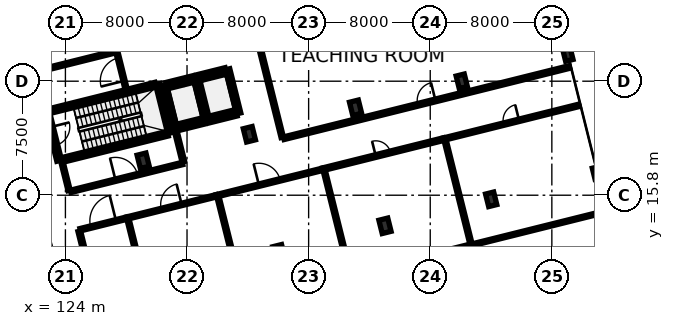
"""IFC4 building model, lengths in metres.
Left out: names, types, materials, properties, quantities, classifications, styles, units other than length and angle.
Written with IfcOpenShell. Run it as: python <this file> out.ifc"""

import sys

from ifc_helpers import new_model, si_unit, direction, frame, frame_2d, origin, origin_2d, place, context, subcontext, project, spatial, rectangle, extrude, element, fill, save


model = new_model("IFC4")
c1 = context("Model", 3, precision=1e-05, world=origin(), true_north=direction((0.0, 1.0)))
c2 = subcontext(c1, "Body", "Model", "MODEL_VIEW")
j1 = project(units=[si_unit("LENGTHUNIT", "METRE"), si_unit("PLANEANGLEUNIT", "RADIAN")], contexts=[c1])
p1 = place(None, origin())
s1 = spatial("IfcSite", under=j1, at=p1, CompositionType="ELEMENT")
p2 = place(p1, origin())
s2 = spatial("IfcBuilding", under=s1, at=p2, CompositionType="ELEMENT")
p3 = place(p2, origin())
s3 = spatial("IfcBuildingStorey", under=s2, at=p3, CompositionType="ELEMENT", Elevation=0.0)
for number, where, z_axis, x_axis in (
    (1, (129.115, 18.067, 0.0), (0.0, 0.0, 1.0), (0.97, 0.242, 0.0)),
    (2, (138.037, 12.046, 0.0), (0.0, 0.0, 1.0), (0.97, 0.242, 0.0)),
    (3, (136.102, 19.808, 0.0), (0.0, 0.0, 1.0), (0.97, 0.242, 0.0)),
    (4, (145.023, 13.788, 0.0), (0.0, 0.0, 1.0), (0.97, 0.242, 0.0)),
    (5, (143.088, 21.55, 0.0), (0.0, 0.0, 1.0), (0.97, 0.242, 0.0)),
):
    element("IfcColumn", number, at=place(p3, frame(where, z_axis=z_axis, x_axis=x_axis)), inside=s3, PredefinedType="COLUMN", context=c2, shape_type="SweptSolid", body=[
        extrude(rectangle(XDim=0.6, YDim=0.9, at=origin_2d()), origin(), (0.0, 0.0, 1.0), 4.7),
    ])
for number, where, z_axis, x_axis in (
    (6, (152.009, 15.53, 0.0), (0.0, 0.0, 1.0), (0.97, 0.242, 0.0)),
    (7, (150.074, 23.292, 0.0), (0.0, 0.0, 1.0), (0.97, 0.242, 0.0)),
):
    element("IfcColumn", number, at=place(p3, frame(where, z_axis=z_axis, x_axis=x_axis)), inside=s3, PredefinedType="COLUMN", context=c2, shape_type="SweptSolid", body=[
        extrude(rectangle(XDim=0.55, YDim=0.85, at=origin_2d()), origin(), (0.0, 0.0, 1.0), 4.7),
    ])
for number, where, z_axis, x_axis in (
    (8, (158.995, 17.271, 0.0), (0.0, 0.0, 1.0), (0.97, 0.242, 0.0)),
    (9, (157.06, 25.034, 0.0), (0.0, 0.0, 1.0), (0.97, 0.242, 0.0)),
):
    element("IfcColumn", number, at=place(p3, frame(where, z_axis=z_axis, x_axis=x_axis)), inside=s3, PredefinedType="COLUMN", context=c2, shape_type="SweptSolid", body=[
        extrude(rectangle(XDim=0.5, YDim=0.75, at=origin_2d()), origin(), (0.0, 0.0, 1.0), 4.7),
    ])
p4 = place(p3, frame((123.75, 18.11, 0.0), z_axis=(0.0, 0.0, 1.0), x_axis=(0.970294108333, 0.241928384724, 0.0)))
e10 = element("IfcWall", 10, at=p4, inside=s3, PredefinedType="SHEAR", context=c2, shape_type="SweptSolid", body=[
    extrude(rectangle(XDim=7.19, YDim=0.32, at=frame_2d((3.595, 0.0))), origin(), (0.0, 0.0, 1.0), 4.7),
])
p5 = place(p3, frame((130.887, 19.889, 0.0), z_axis=(0.0, 0.0, 1.0), x_axis=(-0.241947258837, 0.970289402158, 0.0)))
e11 = element("IfcWall", 11, at=p5, inside=s3, PredefinedType="SHEAR", context=c2, shape_type="SweptSolid", body=[
    extrude(rectangle(XDim=3.32, YDim=0.32, at=frame_2d((1.66, 0.0))), origin(), (0.0, 0.0, 1.0), 4.7),
])
p6 = place(p3, frame((129.924, 23.071, 0.0), z_axis=(0.0, 0.0, 1.0), x_axis=(-0.970294108333, -0.241928384724, 0.0)))
e12 = element("IfcWall", 12, at=p6, inside=s3, PredefinedType="SHEAR", context=c2, shape_type="SweptSolid", body=[
    extrude(rectangle(XDim=7.19, YDim=0.32, at=frame_2d((3.595, 0.0))), origin(), (0.0, 0.0, 1.0), 4.7),
])
p7 = place(p3, frame((122.787, 21.292, 0.0), z_axis=(0.0, 0.0, 1.0), x_axis=(0.241860763027, -0.970310966293, 0.0)))
e13 = element("IfcWall", 13, at=p7, inside=s3, PredefinedType="SHEAR", context=c2, shape_type="SweptSolid", body=[
    extrude(rectangle(XDim=3.32, YDim=0.32, at=frame_2d((1.66, 0.0))), origin(), (0.0, 0.0, 1.0), 4.7),
])
p8 = place(p7, frame((1.035, 0.0, 0.0)))
e14 = element("IfcOpeningElement", 14, at=p8, cuts=e13, PredefinedType="OPENING", context=c2, shape_type="SweptSolid", body=[
    extrude(rectangle(XDim=1.25, YDim=2.2, at=frame_2d((0.625, 1.1))), frame((0.0, 0.172, 0.0), z_axis=(0.0, -1.0, 0.0), x_axis=(1.0, 0.0, 0.0)), (0.0, 0.0, 1.0), 0.344),
])
p9 = place(p3, frame((131.363, 20.176, 0.0), z_axis=(0.0, 0.0, 1.0), x_axis=(0.970284587517, 0.241966566341, 0.0)))
e15 = element("IfcWall", 15, at=p9, inside=s3, PredefinedType="SHEAR", context=c2, shape_type="SweptSolid", body=[
    extrude(rectangle(XDim=1.817, YDim=0.28, at=frame_2d((0.909, 0.0))), origin(), (0.0, 0.0, 1.0), 4.7),
])
p10 = place(p3, frame((133.267, 20.651, 0.0), z_axis=(0.0, 0.0, 1.0), x_axis=(-0.241921647353, 0.970295788171, 0.0)))
e16 = element("IfcWall", 16, at=p10, inside=s3, PredefinedType="SHEAR", context=c2, shape_type="SweptSolid", body=[
    extrude(rectangle(XDim=2.994, YDim=0.28, at=frame_2d((1.497, 0.0))), origin(), (0.0, 0.0, 1.0), 4.7),
])
p11 = place(p3, frame((132.402, 23.521, 0.0), z_axis=(0.0, 0.0, 1.0), x_axis=(-0.970284587517, -0.241966566341, 0.0)))
e17 = element("IfcWall", 17, at=p11, inside=s3, PredefinedType="SHEAR", context=c2, shape_type="SweptSolid", body=[
    extrude(rectangle(XDim=1.817, YDim=0.28, at=frame_2d((0.909, 0.0))), origin(), (0.0, 0.0, 1.0), 4.7),
])
p12 = place(p11, frame((0.259, 0.0, 0.0)))
e18 = element("IfcOpeningElement", 18, at=p12, cuts=e17, PredefinedType="OPENING", context=c2, shape_type="SweptSolid", body=[
    extrude(rectangle(XDim=1.3, YDim=2.2, at=frame_2d((0.65, 1.1))), frame((0.0, 0.152, 0.0), z_axis=(0.0, -1.0, 0.0), x_axis=(1.0, 0.0, 0.0)), (0.0, 0.0, 1.0), 0.304),
])
p13 = place(p3, frame((130.498, 23.046, 0.0), z_axis=(0.0, 0.0, 1.0), x_axis=(0.241921647353, -0.970295788171, 0.0)))
e19 = element("IfcWall", 19, at=p13, inside=s3, PredefinedType="SHEAR", context=c2, shape_type="SweptSolid", body=[
    extrude(rectangle(XDim=2.994, YDim=0.28, at=frame_2d((1.497, 0.0))), origin(), (0.0, 0.0, 1.0), 4.7),
])
p14 = place(p3, frame((133.408, 20.686, 0.0), z_axis=(0.0, 0.0, 1.0), x_axis=(0.970285190026, 0.241964150272, 0.0)))
e20 = element("IfcWall", 20, at=p14, inside=s3, PredefinedType="SHEAR", context=c2, shape_type="SweptSolid", body=[
    extrude(rectangle(XDim=1.91, YDim=0.28, at=frame_2d((0.955, 0.0))), origin(), (0.0, 0.0, 1.0), 4.7),
])
p15 = place(p3, frame((135.402, 21.183, 0.0), z_axis=(0.0, 0.0, 1.0), x_axis=(-0.241921647353, 0.970295788171, 0.0)))
e21 = element("IfcWall", 21, at=p15, inside=s3, PredefinedType="SHEAR", context=c2, shape_type="SweptSolid", body=[
    extrude(rectangle(XDim=2.994, YDim=0.28, at=frame_2d((1.497, 0.0))), origin(), (0.0, 0.0, 1.0), 4.7),
])
p16 = place(p3, frame((134.537, 24.053, 0.0), z_axis=(0.0, 0.0, 1.0), x_axis=(-0.970285190026, -0.241964150272, 0.0)))
e22 = element("IfcWall", 22, at=p16, inside=s3, PredefinedType="SHEAR", context=c2, shape_type="SweptSolid", body=[
    extrude(rectangle(XDim=1.91, YDim=0.28, at=frame_2d((0.955, 0.0))), origin(), (0.0, 0.0, 1.0), 4.7),
])
p17 = place(p16, frame((0.305, 0.0, 0.0)))
e23 = element("IfcOpeningElement", 23, at=p17, cuts=e22, PredefinedType="OPENING", context=c2, shape_type="SweptSolid", body=[
    extrude(rectangle(XDim=1.3, YDim=2.2, at=frame_2d((0.65, 1.1))), frame((0.0, 0.152, 0.0), z_axis=(0.0, -1.0, 0.0), x_axis=(1.0, 0.0, 0.0)), (0.0, 0.0, 1.0), 0.304),
])
p18 = place(p3, frame((124.346, 16.053, 0.0), z_axis=(0.0, 0.0, 1.0), x_axis=(0.970295772287, 0.241921711059, 0.0)))
e24 = element("IfcWall", 24, at=p18, inside=s3, PredefinedType="PARTITIONING", context=c2, shape_type="SweptSolid", body=[
    extrude(rectangle(XDim=7.58, YDim=0.16, at=frame_2d((3.79, 0.0))), origin(), (0.0, 0.0, 1.0), 3.885),
])
p19 = place(p18, frame((3.04, 0.0, 0.0)))
e25 = element("IfcOpeningElement", 25, at=p19, cuts=e24, PredefinedType="OPENING", context=c2, shape_type="SweptSolid", body=[
    extrude(rectangle(XDim=1.5, YDim=2.28, at=frame_2d((0.75, 1.14))), frame((0.0, 0.092, 0.0), z_axis=(0.0, -1.0, 0.0), x_axis=(1.0, 0.0, 0.0)), (0.0, 0.0, 1.0), 0.184),
])
p20 = place(p3, frame((127.995, 22.767, 0.0), z_axis=(0.0, 0.0, 1.0), x_axis=(-0.241877500256, 0.9703067942, 0.0)))
e26 = element("IfcWall", 26, at=p20, inside=s3, PredefinedType="PARTITIONING", context=c2, shape_type="SweptSolid", body=[
    extrude(rectangle(XDim=2.706, YDim=0.15, at=frame_2d((1.353, 0.0))), origin(), (0.0, 0.0, 1.0), 4.7),
])
p21 = place(p20, frame((0.573, 0.0, 0.0)))
e27 = element("IfcOpeningElement", 27, at=p21, cuts=e26, PredefinedType="OPENING", context=c2, shape_type="SweptSolid", body=[
    extrude(rectangle(XDim=1.56, YDim=2.3, at=frame_2d((0.78, 1.15))), frame((0.0, 0.087, 0.0), z_axis=(0.0, -1.0, 0.0), x_axis=(1.0, 0.0, 0.0)), (0.0, 0.0, 1.0), 0.174),
])
p22 = place(p3, frame((124.975, 13.53, 0.0), z_axis=(0.0, 0.0, 1.0), x_axis=(0.970289141252, 0.241948305158, 0.0)))
e28 = element("IfcWall", 28, at=p22, inside=s3, PredefinedType="PARTITIONING", context=c2, shape_type="SweptSolid", body=[
    extrude(rectangle(XDim=3.13, YDim=0.16, at=frame_2d((1.565, 0.0))), origin(), (0.0, 0.0, 1.0), 4.7),
])
p23 = place(p22, frame((0.705, 0.0, 0.0)))
e29 = element("IfcOpeningElement", 29, at=p23, cuts=e28, PredefinedType="OPENING", context=c2, shape_type="SweptSolid", body=[
    extrude(rectangle(XDim=1.72, YDim=2.34, at=frame_2d((0.86, 1.17))), frame((0.0, 0.092, 0.0), z_axis=(0.0, -1.0, 0.0), x_axis=(1.0, 0.0, 0.0)), (0.0, 0.0, 1.0), 0.184),
])
p24 = place(p3, frame((128.023, 14.29, 0.0), z_axis=(0.0, 0.0, 1.0), x_axis=(0.970293282145, 0.241931698263, 0.0)))
e30 = element("IfcWall", 30, at=p24, inside=s3, PredefinedType="PARTITIONING", context=c2, shape_type="SweptSolid", body=[
    extrude(rectangle(XDim=6.088, YDim=0.16, at=frame_2d((3.044, 0.0))), origin(), (0.0, 0.0, 1.0), 3.885),
])
p25 = place(p24, frame((2.354, 0.0, 0.0)))
e31 = element("IfcOpeningElement", 31, at=p25, cuts=e30, PredefinedType="OPENING", context=c2, shape_type="SweptSolid", body=[
    extrude(rectangle(XDim=1.38, YDim=2.3, at=frame_2d((0.69, 1.15))), frame((0.0, 0.092, 0.0), z_axis=(0.0, -1.0, 0.0), x_axis=(1.0, 0.0, 0.0)), (0.0, 0.0, 1.0), 0.184),
])
p26 = place(p3, frame((133.942, 15.766, 0.0), z_axis=(0.0, 0.0, 1.0), x_axis=(0.970292162734, 0.241936187739, 0.0)))
e32 = element("IfcWall", 32, at=p26, inside=s3, PredefinedType="PARTITIONING", context=c2, shape_type="SweptSolid", body=[
    extrude(rectangle(XDim=7.188, YDim=0.16, at=frame_2d((3.594, 0.0))), origin(), (0.0, 0.0, 1.0), 3.885),
])
p27 = place(p26, frame((2.874, 0.0, 0.0)))
e33 = element("IfcOpeningElement", 33, at=p27, cuts=e32, PredefinedType="OPENING", context=c2, shape_type="SweptSolid", body=[
    extrude(rectangle(XDim=1.44, YDim=2.32, at=frame_2d((0.72, 1.16))), frame((0.0, 0.092, 0.0), z_axis=(0.0, -1.0, 0.0), x_axis=(1.0, 0.0, 0.0)), (0.0, 0.0, 1.0), 0.184),
])
p28 = place(p3, frame((140.928, 17.508, 0.0), z_axis=(0.0, 0.0, 1.0), x_axis=(0.970293149657, 0.241932229621, 0.0)))
e34 = element("IfcWall", 34, at=p28, inside=s3, PredefinedType="PARTITIONING", context=c2, shape_type="SweptSolid", body=[
    extrude(rectangle(XDim=8.188, YDim=0.18, at=frame_2d((4.094, 0.0))), origin(), (0.0, 0.0, 1.0), 3.885),
])
p29 = place(p28, frame((3.594, 0.0, 0.0)))
e35 = element("IfcOpeningElement", 35, at=p29, cuts=e34, PredefinedType="OPENING", context=c2, shape_type="SweptSolid", body=[
    extrude(rectangle(XDim=1.0, YDim=2.15, at=frame_2d((0.5, 1.075))), frame((0.0, 0.102, 0.0), z_axis=(0.0, -1.0, 0.0), x_axis=(1.0, 0.0, 0.0)), (0.0, 0.0, 1.0), 0.204),
])
p30 = place(p3, frame((148.885, 19.491, 0.0), z_axis=(0.0, 0.0, 1.0), x_axis=(0.970294203895, 0.241928001454, 0.0)))
e36 = element("IfcWall", 36, at=p30, inside=s3, PredefinedType="PARTITIONING", context=c2, shape_type="SweptSolid", body=[
    extrude(rectangle(XDim=9.171, YDim=0.16, at=frame_2d((4.585, 0.0))), origin(), (0.0, 0.0, 1.0), 3.885),
])
p31 = place(p30, frame((4.061, 0.0, 0.0)))
e37 = element("IfcOpeningElement", 37, at=p31, cuts=e36, PredefinedType="OPENING", context=c2, shape_type="SweptSolid", body=[
    extrude(rectangle(XDim=1.05, YDim=2.15, at=frame_2d((0.525, 1.075))), frame((0.0, 0.092, 0.0), z_axis=(0.0, -1.0, 0.0), x_axis=(1.0, 0.0, 0.0)), (0.0, 0.0, 1.0), 0.184),
])
p32 = place(p3, frame((138.367, 19.549, 0.0), z_axis=(0.0, 0.0, 1.0), x_axis=(0.970295834183, 0.241921462809, 0.0)))
e38 = element("IfcWall", 38, at=p32, inside=s3, PredefinedType="PARTITIONING", context=c2, shape_type="SweptSolid", body=[
    extrude(rectangle(XDim=19.363, YDim=0.18, at=frame_2d((9.682, 0.0))), origin(), (0.0, 0.0, 1.0), 3.885),
])
p33 = place(p32, frame((9.082, 0.0, 0.0)))
e39 = element("IfcOpeningElement", 39, at=p33, cuts=e38, PredefinedType="OPENING", context=c2, shape_type="SweptSolid", body=[
    extrude(rectangle(XDim=1.2, YDim=2.15, at=frame_2d((0.6, 1.075))), frame((0.0, 0.102, 0.0), z_axis=(0.0, -1.0, 0.0), x_axis=(1.0, 0.0, 0.0)), (0.0, 0.0, 1.0), 0.204),
])
p34 = place(p3, frame((124.243, 16.115, 0.0), z_axis=(0.0, 0.0, 1.0), x_axis=(-0.24202255973, 0.970270622343, 0.0)))
e40 = element("IfcWall", 40, at=p34, inside=s3, PredefinedType="PARTITIONING", context=c2, shape_type="SweptSolid", body=[
    extrude(rectangle(XDim=1.792, YDim=0.15, at=frame_2d((0.896, 0.0))), origin(), (0.0, 0.0, 1.0), 3.985),
])
p35 = place(p3, frame((131.763, 17.99, 0.0), z_axis=(0.0, 0.0, 1.0), x_axis=(-0.241962612769, 0.970285573438, 0.0)))
e41 = element("IfcWall", 41, at=p35, inside=s3, PredefinedType="PARTITIONING", context=c2, shape_type="SweptSolid", body=[
    extrude(rectangle(XDim=2.206, YDim=0.18, at=frame_2d((1.103, 0.0))), origin(), (0.0, 0.0, 1.0), 3.985),
])
p36 = place(p3, frame((120.535, 23.554, 0.0), z_axis=(0.0, 0.0, 1.0), x_axis=(0.970294973208, 0.241924915969, 0.0)))
e42 = element("IfcWall", 42, at=p36, inside=s3, PredefinedType="PARTITIONING", context=c2, shape_type="SweptSolid", body=[
    extrude(rectangle(XDim=6.961, YDim=0.16, at=frame_2d((3.48, 0.0))), origin(), (0.0, 0.0, 1.0), 3.985),
])
p37 = place(p3, frame((126.58, 6.74, 0.0), z_axis=(0.0, 0.0, 1.0), x_axis=(-0.24192707633, 0.97029443456, 0.0)))
e43 = element("IfcWall", 43, at=p37, inside=s3, PredefinedType="PARTITIONING", context=c2, shape_type="SweptSolid", body=[
    extrude(rectangle(XDim=6.892, YDim=0.18, at=frame_2d((3.446, 0.0))), origin(), (0.0, 0.0, 1.0), 3.985),
])
p38 = place(p3, frame((129.804, 7.45, 0.0), z_axis=(0.0, 0.0, 1.0), x_axis=(-0.241901504068, 0.970300810228, 0.0)))
e44 = element("IfcWall", 44, at=p38, inside=s3, PredefinedType="PARTITIONING", context=c2, shape_type="SweptSolid", body=[
    extrude(rectangle(XDim=6.976, YDim=0.15, at=frame_2d((3.488, 0.0))), origin(), (0.0, 0.0, 1.0), 3.985),
])
p39 = place(p3, frame((135.737, 8.87, 0.0), z_axis=(0.0, 0.0, 1.0), x_axis=(-0.241939357675, 0.970291372325, 0.0)))
e45 = element("IfcWall", 45, at=p39, inside=s3, PredefinedType="PARTITIONING", context=c2, shape_type="SweptSolid", body=[
    extrude(rectangle(XDim=7.033, YDim=0.15, at=frame_2d((3.517, 0.0))), origin(), (0.0, 0.0, 1.0), 3.985),
])
p40 = place(p3, frame((142.72, 10.622, 0.0), z_axis=(0.0, 0.0, 1.0), x_axis=(-0.241913043167, 0.970297933393, 0.0)))
e46 = element("IfcWall", 46, at=p40, inside=s3, PredefinedType="PARTITIONING", context=c2, shape_type="SweptSolid", body=[
    extrude(rectangle(XDim=7.013, YDim=0.15, at=frame_2d((3.506, 0.0))), origin(), (0.0, 0.0, 1.0), 3.985),
])
p41 = place(p3, frame((142.67, 10.522, 0.0), z_axis=(0.0, 0.0, 1.0), x_axis=(0.970298403727, 0.241911156677, 0.0)))
e47 = element("IfcWall", 47, at=p41, inside=s3, PredefinedType="PARTITIONING", context=c2, shape_type="SweptSolid", body=[
    extrude(rectangle(XDim=8.188, YDim=0.15, at=frame_2d((4.094, 0.0))), origin(), (0.0, 0.0, 1.0), 3.885),
])
p42 = place(p3, frame((150.677, 12.605, 0.0), z_axis=(0.0, 0.0, 1.0), x_axis=(-0.241913935588, 0.970297710895, 0.0)))
e48 = element("IfcWall", 48, at=p42, inside=s3, PredefinedType="PARTITIONING", context=c2, shape_type="SweptSolid", body=[
    extrude(rectangle(XDim=7.023, YDim=0.15, at=frame_2d((3.511, 0.0))), origin(), (0.0, 0.0, 1.0), 3.985),
])
p43 = place(p3, frame((150.627, 12.505, 0.0), z_axis=(0.0, 0.0, 1.0), x_axis=(0.970292717865, 0.241933961357, 0.0)))
e49 = element("IfcWall", 49, at=p43, inside=s3, PredefinedType="PARTITIONING", context=c2, shape_type="SweptSolid", body=[
    extrude(rectangle(XDim=9.071, YDim=0.125, at=frame_2d((4.536, 0.0))), origin(), (0.0, 0.0, 1.0), 3.885),
])
p44 = place(p3, frame((138.264, 19.611, 0.0), z_axis=(0.0, 0.0, 1.0), x_axis=(-0.241920353256, 0.970296110824, 0.0)))
e50 = element("IfcWall", 50, at=p44, inside=s3, PredefinedType="PARTITIONING", context=c2, shape_type="SweptSolid", body=[
    extrude(rectangle(XDim=8.03, YDim=0.16, at=frame_2d((4.015, 0.0))), origin(), (0.0, 0.0, 1.0), 3.985),
])
p45 = place(p8, origin())
e51 = element("IfcDoor", 51, at=p45, inside=s3, OperationType="SINGLE_SWING_LEFT", PredefinedType="DOOR", context=c2, shape_type="SweptSolid", body=[
    extrude(rectangle(XDim=1.25, YDim=2.2, at=frame_2d((0.625, 1.1))), frame((0.0, 0.025, 0.0), z_axis=(0.0, -1.0, 0.0), x_axis=(1.0, 0.0, 0.0)), (0.0, 0.0, 1.0), 0.05),
])
fill(e14, e51)
p46 = place(p12, origin())
e52 = element("IfcDoor", 52, at=p46, inside=s3, OperationType="SLIDING_TO_LEFT", PredefinedType="DOOR", context=c2, shape_type="SweptSolid", body=[
    extrude(rectangle(XDim=1.3, YDim=2.2, at=frame_2d((0.65, 1.1))), frame((0.0, 0.025, 0.0), z_axis=(0.0, -1.0, 0.0), x_axis=(1.0, 0.0, 0.0)), (0.0, 0.0, 1.0), 0.05),
])
fill(e18, e52)
p47 = place(p17, origin())
e53 = element("IfcDoor", 53, at=p47, inside=s3, OperationType="SLIDING_TO_RIGHT", PredefinedType="DOOR", context=c2, shape_type="SweptSolid", body=[
    extrude(rectangle(XDim=1.3, YDim=2.2, at=frame_2d((0.65, 1.1))), frame((0.0, 0.025, 0.0), z_axis=(0.0, -1.0, 0.0), x_axis=(1.0, 0.0, 0.0)), (0.0, 0.0, 1.0), 0.05),
])
fill(e23, e53)
p48 = place(p19, origin())
e54 = element("IfcDoor", 54, at=p48, inside=s3, OperationType="SINGLE_SWING_LEFT", PredefinedType="DOOR", context=c2, shape_type="SweptSolid", body=[
    extrude(rectangle(XDim=1.5, YDim=2.28, at=frame_2d((0.75, 1.14))), frame((0.0, 0.025, 0.0), z_axis=(0.0, -1.0, 0.0), x_axis=(1.0, 0.0, 0.0)), (0.0, 0.0, 1.0), 0.05),
])
fill(e25, e54)
p49 = place(p21, origin())
e55 = element("IfcDoor", 55, at=p49, inside=s3, OperationType="SINGLE_SWING_LEFT", PredefinedType="DOOR", context=c2, shape_type="SweptSolid", body=[
    extrude(rectangle(XDim=1.56, YDim=2.3, at=frame_2d((0.78, 1.15))), frame((0.0, 0.025, 0.0), z_axis=(0.0, -1.0, 0.0), x_axis=(1.0, 0.0, 0.0)), (0.0, 0.0, 1.0), 0.05),
])
fill(e27, e55)
p50 = place(p23, origin())
e56 = element("IfcDoor", 56, at=p50, inside=s3, OperationType="SINGLE_SWING_RIGHT", PredefinedType="DOOR", context=c2, shape_type="SweptSolid", body=[
    extrude(rectangle(XDim=1.72, YDim=2.34, at=frame_2d((0.86, 1.17))), frame((0.0, 0.025, 0.0), z_axis=(0.0, -1.0, 0.0), x_axis=(1.0, 0.0, 0.0)), (0.0, 0.0, 1.0), 0.05),
])
fill(e29, e56)
p51 = place(p25, origin())
e57 = element("IfcDoor", 57, at=p51, inside=s3, OperationType="SINGLE_SWING_RIGHT", PredefinedType="DOOR", context=c2, shape_type="SweptSolid", body=[
    extrude(rectangle(XDim=1.38, YDim=2.3, at=frame_2d((0.69, 1.15))), frame((0.0, 0.025, 0.0), z_axis=(0.0, -1.0, 0.0), x_axis=(1.0, 0.0, 0.0)), (0.0, 0.0, 1.0), 0.05),
])
fill(e31, e57)
p52 = place(p27, origin())
e58 = element("IfcDoor", 58, at=p52, inside=s3, OperationType="SINGLE_SWING_LEFT", PredefinedType="DOOR", context=c2, shape_type="SweptSolid", body=[
    extrude(rectangle(XDim=1.44, YDim=2.32, at=frame_2d((0.72, 1.16))), frame((0.0, 0.025, 0.0), z_axis=(0.0, -1.0, 0.0), x_axis=(1.0, 0.0, 0.0)), (0.0, 0.0, 1.0), 0.05),
])
fill(e33, e58)
p53 = place(p29, origin())
e59 = element("IfcDoor", 59, at=p53, inside=s3, OperationType="SINGLE_SWING_LEFT", PredefinedType="DOOR", context=c2, shape_type="SweptSolid", body=[
    extrude(rectangle(XDim=1.0, YDim=2.15, at=frame_2d((0.5, 1.075))), frame((0.0, 0.025, 0.0), z_axis=(0.0, -1.0, 0.0), x_axis=(1.0, 0.0, 0.0)), (0.0, 0.0, 1.0), 0.05),
])
fill(e35, e59)
p54 = place(p31, origin())
e60 = element("IfcDoor", 60, at=p54, inside=s3, OperationType="SINGLE_SWING_RIGHT", PredefinedType="DOOR", context=c2, shape_type="SweptSolid", body=[
    extrude(rectangle(XDim=1.05, YDim=2.15, at=frame_2d((0.525, 1.075))), frame((0.0, 0.025, 0.0), z_axis=(0.0, -1.0, 0.0), x_axis=(1.0, 0.0, 0.0)), (0.0, 0.0, 1.0), 0.05),
])
fill(e37, e60)
p55 = place(p33, origin())
e61 = element("IfcDoor", 61, at=p55, inside=s3, OperationType="SINGLE_SWING_RIGHT", PredefinedType="DOOR", context=c2, shape_type="SweptSolid", body=[
    extrude(rectangle(XDim=1.2, YDim=2.15, at=frame_2d((0.6, 1.075))), frame((0.0, 0.025, 0.0), z_axis=(0.0, -1.0, 0.0), x_axis=(1.0, 0.0, 0.0)), (0.0, 0.0, 1.0), 0.05),
])
fill(e39, e61)
save(model, sys.argv[1])
